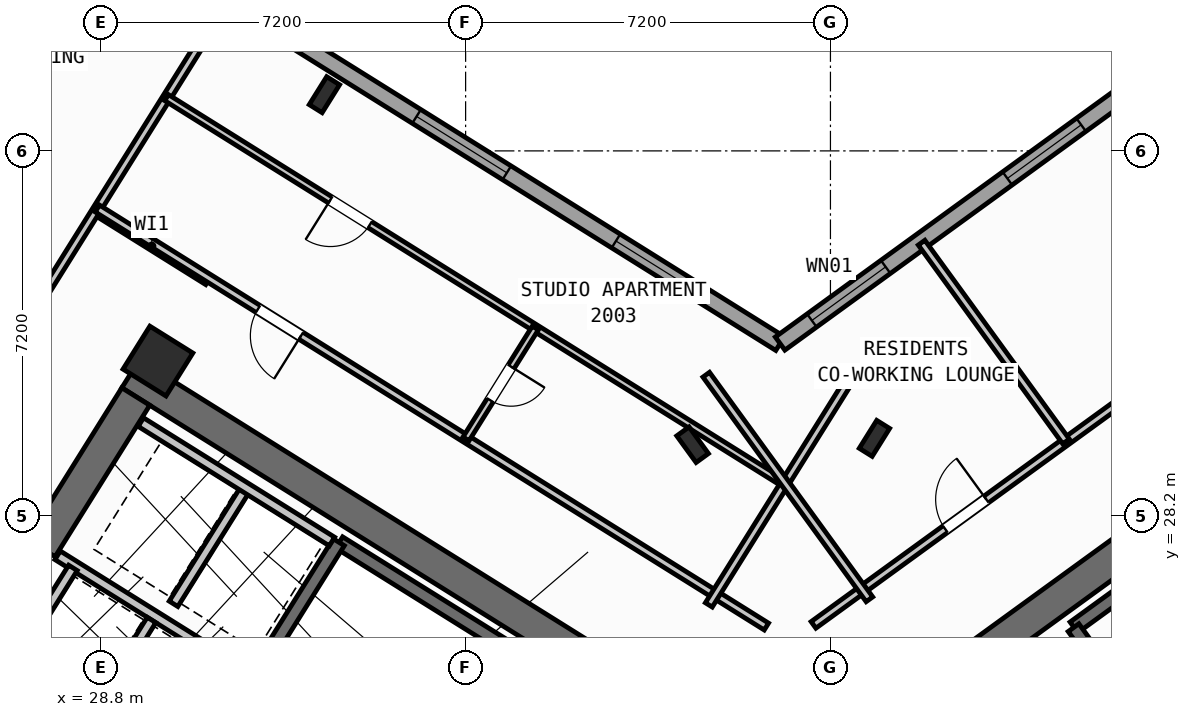
"""IFC4 building model, lengths in metres.
Left out: names, types, materials, properties, quantities, classifications, styles, units other than length and angle.
Written with IfcOpenShell. Run it as: python <this file> out.ifc"""

import sys

from ifc_helpers import new_model, si_unit, direction, frame, frame_2d, origin, origin_2d, place, context, subcontext, project, spatial, rectangle, hollow_rectangle, i_section, extrude, source, transform, mapped, element, fill, save


model = new_model("IFC4")
c1 = context("Model", 3, precision=1e-05, world=origin(), true_north=direction((0.0, 1.0)))
c2 = subcontext(c1, "Body", "Model", "MODEL_VIEW")
j1 = project(units=[si_unit("LENGTHUNIT", "METRE"), si_unit("PLANEANGLEUNIT", "RADIAN")], contexts=[c1])
p1 = place(None, origin())
s1 = spatial("IfcSite", under=j1, at=p1, CompositionType="ELEMENT")
p2 = place(p1, origin())
s2 = spatial("IfcBuilding", under=s1, at=p2, CompositionType="ELEMENT")
p3 = place(p2, frame((0.0, 0.0, 81.0)))
s3 = spatial("IfcBuildingStorey", under=s2, at=p3, CompositionType="ELEMENT", Elevation=81.0)
p4 = place(p3, frame((40.615, 23.983, 0.0), z_axis=(0.0, 0.0, 1.0), x_axis=(-0.848045953968, 0.529922692436, 0.0)))
e1 = element("IfcWall", 1, at=p4, inside=s3, PredefinedType="SHEAR", context=c2, shape_type="SweptSolid", body=[
    extrude(rectangle(XDim=13.24, YDim=0.65, at=frame_2d((6.62, 0.0))), origin(), (0.0, 0.0, 1.0), 3.32),
])
p5 = place(p3, frame((29.491, 30.552, 0.0), z_axis=(0.0, 0.0, 1.0), x_axis=(-0.529893103397, -0.8480644427, 0.0)))
e2 = element("IfcWall", 2, at=p5, inside=s3, PredefinedType="SHEAR", context=c2, shape_type="SweptSolid", body=[
    extrude(rectangle(XDim=3.525, YDim=0.65, at=frame_2d((1.763, 0.0))), origin(), (0.0, 0.0, 1.0), 3.32),
])
p6 = place(p3, frame((44.325, 24.113, 0.0), z_axis=(0.0, 0.0, 1.0), x_axis=(0.809012664862, 0.58779121131, 0.0)))
e3 = element("IfcWall", 3, at=p6, inside=s3, PredefinedType="SHEAR", context=c2, shape_type="SweptSolid", body=[
    extrude(rectangle(XDim=12.44, YDim=0.65, at=frame_2d((6.22, 0.0))), origin(), (0.0, 0.0, 1.0), 3.32),
])
m1 = source(origin(), c2, "Body", "SweptSolid", [
    extrude(i_section(OverallWidth=0.3, OverallDepth=0.65, WebThickness=0.016, FlangeThickness=0.031, at=origin_2d()), origin(), (0.0, 0.0, 1.0), 3.6),
])
for number, where, z_axis, x_axis in (
    (4, (44.068, 29.726, 0.0), (0.0, 0.0, 1.0), (-0.848, 0.53, 0.0)),
    (5, (33.213, 36.509, 0.0), (0.0, 0.0, 1.0), (-0.848, 0.53, 0.0)),
):
    element("IfcColumn", number, at=place(p3, frame(where, z_axis=z_axis, x_axis=x_axis)), inside=s3, PredefinedType="COLUMN", context=c2, shape_type="MappedRepresentation", body=[
        mapped(m1, transform((0.0, 0.0, 0.0), scale=1.0)),
    ])
m2 = source(origin(), c2, "Body", "SweptSolid", [
    extrude(hollow_rectangle(XDim=1.0, YDim=1.0, WallThickness=0.04, at=origin_2d()), origin(), (0.0, 0.0, 1.0), 3.6),
])
p7 = place(p3, frame((29.928, 31.251, 0.0), z_axis=(0.0, 0.0, 1.0), x_axis=(-0.848048096156, 0.529919264233, 0.0)))
e6 = element("IfcColumn", 6, at=p7, inside=s3, PredefinedType="COLUMN", context=c2, shape_type="MappedRepresentation", body=[
    mapped(m2, transform((0.0, 0.0, 0.0), scale=1.0)),
])
p8 = place(p3, frame((40.479, 29.601, 0.0), z_axis=(0.0, 0.0, 1.0), x_axis=(0.809016994375, 0.587785252292, 0.0)))
e7 = element("IfcColumn", 7, at=p8, inside=s3, PredefinedType="COLUMN", context=c2, shape_type="MappedRepresentation", body=[
    mapped(m1, transform((0.0, 0.0, 0.0), scale=1.0)),
])
p9 = place(p3, frame((31.76, 12.183, 0.0), z_axis=(0.0, 0.0, 1.0), x_axis=(-0.848047074256, 0.529920899612, 0.0)))
e8 = element("IfcWall", 8, at=p9, inside=s3, PredefinedType="STANDARD", context=c2, shape_type="SweptSolid", body=[
    extrude(rectangle(XDim=30.652, YDim=0.32, at=frame_2d((15.326, 0.0))), origin(), (0.0, 0.0, 1.0), 3.32),
])
p10 = place(p9, frame((14.878, 0.0, 0.0)))
e9 = element("IfcOpeningElement", 9, at=p10, cuts=e8, PredefinedType="OPENING", context=c2, shape_type="SweptSolid", body=[
    extrude(rectangle(XDim=1.2, YDim=2.15, at=frame_2d((0.6, 1.075))), frame((0.0, 0.17, 0.0), z_axis=(0.0, -1.0, 0.0), x_axis=(1.0, 0.0, 0.0)), (0.0, 0.0, 1.0), 0.34),
])
p11 = place(p9, frame((1.99, 0.0, 0.8)))
e10 = element("IfcOpeningElement", 10, at=p11, cuts=e8, PredefinedType="OPENING", context=c2, shape_type="SweptSolid", body=[
    extrude(rectangle(XDim=2.1, YDim=1.55, at=frame_2d((1.05, 0.775))), frame((0.0, 0.17, 0.0), z_axis=(0.0, -1.0, 0.0), x_axis=(1.0, 0.0, 0.0)), (0.0, 0.0, 1.0), 0.34),
])
p12 = place(p9, frame((7.169, 0.0, 0.8)))
e11 = element("IfcOpeningElement", 11, at=p12, cuts=e8, PredefinedType="OPENING", context=c2, shape_type="SweptSolid", body=[
    extrude(rectangle(XDim=2.1, YDim=1.55, at=frame_2d((1.05, 0.775))), frame((0.0, 0.17, 0.0), z_axis=(0.0, -1.0, 0.0), x_axis=(1.0, 0.0, 0.0)), (0.0, 0.0, 1.0), 0.34),
])
p13 = place(p9, frame((21.289, 0.0, 0.85)))
e12 = element("IfcOpeningElement", 12, at=p13, cuts=e8, PredefinedType="OPENING", context=c2, shape_type="SweptSolid", body=[
    extrude(rectangle(XDim=1.5, YDim=1.5, at=frame_2d((0.75, 0.75))), frame((0.0, 0.17, 0.0), z_axis=(0.0, -1.0, 0.0), x_axis=(1.0, 0.0, 0.0)), (0.0, 0.0, 1.0), 0.34),
])
p14 = place(p9, frame((25.59, 0.0, 1.0)))
e13 = element("IfcOpeningElement", 13, at=p14, cuts=e8, PredefinedType="OPENING", context=c2, shape_type="SweptSolid", body=[
    extrude(rectangle(XDim=0.9, YDim=1.25, at=frame_2d((0.45, 0.625))), frame((0.0, 0.17, 0.0), z_axis=(0.0, -1.0, 0.0), x_axis=(1.0, 0.0, 0.0)), (0.0, 0.0, 1.0), 0.34),
])
p15 = place(p9, frame((28.47, 0.0, 1.0)))
e14 = element("IfcOpeningElement", 14, at=p15, cuts=e8, PredefinedType="OPENING", context=c2, shape_type="SweptSolid", body=[
    extrude(rectangle(XDim=0.9, YDim=1.25, at=frame_2d((0.45, 0.625))), frame((0.0, 0.17, 0.0), z_axis=(0.0, -1.0, 0.0), x_axis=(1.0, 0.0, 0.0)), (0.0, 0.0, 1.0), 0.34),
])
p16 = place(p3, frame((17.424, 47.083, 0.0), z_axis=(0.0, 0.0, 1.0), x_axis=(0.848049927979, -0.529916332693, 0.0)))
e15 = element("IfcWall", 15, at=p16, inside=s3, PredefinedType="STANDARD", context=c2, shape_type="SweptSolid", body=[
    extrude(rectangle(XDim=29.223, YDim=0.32, at=frame_2d((14.612, 0.0))), origin(), (0.0, 0.0, 1.0), 3.32),
])
p17 = place(p16, frame((3.709, 0.0, 0.0)))
e16 = element("IfcOpeningElement", 16, at=p17, cuts=e15, PredefinedType="OPENING", context=c2, shape_type="SweptSolid", body=[
    extrude(rectangle(XDim=1.05, YDim=2.15, at=frame_2d((0.525, 1.075))), frame((0.0, 0.17, 0.0), z_axis=(0.0, -1.0, 0.0), x_axis=(1.0, 0.0, 0.0)), (0.0, 0.0, 1.0), 0.34),
])
p18 = place(p16, frame((0.659, 0.0, 0.95)))
e17 = element("IfcOpeningElement", 17, at=p18, cuts=e15, PredefinedType="OPENING", context=c2, shape_type="SweptSolid", body=[
    extrude(rectangle(XDim=1.2, YDim=1.4, at=frame_2d((0.6, 0.7))), frame((0.0, 0.17, 0.0), z_axis=(0.0, -1.0, 0.0), x_axis=(1.0, 0.0, 0.0)), (0.0, 0.0, 1.0), 0.34),
])
p19 = place(p16, frame((7.369, 0.0, 0.85)))
e18 = element("IfcOpeningElement", 18, at=p19, cuts=e15, PredefinedType="OPENING", context=c2, shape_type="SweptSolid", body=[
    extrude(rectangle(XDim=1.8, YDim=1.5, at=frame_2d((0.9, 0.75))), frame((0.0, 0.17, 0.0), z_axis=(0.0, -1.0, 0.0), x_axis=(1.0, 0.0, 0.0)), (0.0, 0.0, 1.0), 0.34),
])
p20 = place(p16, frame((11.009, 0.0, 1.0)))
e19 = element("IfcOpeningElement", 19, at=p20, cuts=e15, PredefinedType="OPENING", context=c2, shape_type="SweptSolid", body=[
    extrude(rectangle(XDim=0.9, YDim=1.25, at=frame_2d((0.45, 0.625))), frame((0.0, 0.17, 0.0), z_axis=(0.0, -1.0, 0.0), x_axis=(1.0, 0.0, 0.0)), (0.0, 0.0, 1.0), 0.34),
])
p21 = place(p16, frame((13.874, 0.0, 0.95)))
e20 = element("IfcOpeningElement", 20, at=p21, cuts=e15, PredefinedType="OPENING", context=c2, shape_type="SweptSolid", body=[
    extrude(rectangle(XDim=1.2, YDim=1.4, at=frame_2d((0.6, 0.7))), frame((0.0, 0.17, 0.0), z_axis=(0.0, -1.0, 0.0), x_axis=(1.0, 0.0, 0.0)), (0.0, 0.0, 1.0), 0.34),
])
p22 = place(p16, frame((17.254, 0.0, 1.0)))
e21 = element("IfcOpeningElement", 21, at=p22, cuts=e15, PredefinedType="OPENING", context=c2, shape_type="SweptSolid", body=[
    extrude(rectangle(XDim=0.9, YDim=1.25, at=frame_2d((0.45, 0.625))), frame((0.0, 0.17, 0.0), z_axis=(0.0, -1.0, 0.0), x_axis=(1.0, 0.0, 0.0)), (0.0, 0.0, 1.0), 0.34),
])
p23 = place(p16, frame((20.764, 0.0, 0.8)))
e22 = element("IfcOpeningElement", 22, at=p23, cuts=e15, PredefinedType="OPENING", context=c2, shape_type="SweptSolid", body=[
    extrude(rectangle(XDim=2.1, YDim=1.55, at=frame_2d((1.05, 0.775))), frame((0.0, 0.17, 0.0), z_axis=(0.0, -1.0, 0.0), x_axis=(1.0, 0.0, 0.0)), (0.0, 0.0, 1.0), 0.34),
])
p24 = place(p16, frame((25.403, 0.0, 0.8)))
e23 = element("IfcOpeningElement", 23, at=p24, cuts=e15, PredefinedType="OPENING", context=c2, shape_type="SweptSolid", body=[
    extrude(rectangle(XDim=2.1, YDim=1.55, at=frame_2d((1.05, 0.775))), frame((0.0, 0.17, 0.0), z_axis=(0.0, -1.0, 0.0), x_axis=(1.0, 0.0, 0.0)), (0.0, 0.0, 1.0), 0.34),
])
p25 = place(p3, frame((42.207, 31.597, 0.0), z_axis=(0.0, 0.0, 1.0), x_axis=(0.809020333377, 0.587780656523, 0.0)))
e24 = element("IfcWall", 24, at=p25, inside=s3, PredefinedType="STANDARD", context=c2, shape_type="SweptSolid", body=[
    extrude(rectangle(XDim=15.223, YDim=0.32, at=frame_2d((7.611, 0.0))), origin(), (0.0, 0.0, 1.0), 3.32),
])
p26 = place(p25, frame((12.82, 0.0, 0.0)))
e25 = element("IfcOpeningElement", 25, at=p26, cuts=e24, PredefinedType="OPENING", context=c2, shape_type="SweptSolid", body=[
    extrude(rectangle(XDim=1.05, YDim=2.15, at=frame_2d((0.525, 1.075))), frame((0.0, 0.17, 0.0), z_axis=(0.0, -1.0, 0.0), x_axis=(1.0, 0.0, 0.0)), (0.0, 0.0, 1.0), 0.34),
])
p27 = place(p25, frame((0.775, 0.0, 0.85)))
e26 = element("IfcOpeningElement", 26, at=p27, cuts=e24, PredefinedType="OPENING", context=c2, shape_type="SweptSolid", body=[
    extrude(rectangle(XDim=1.8, YDim=1.5, at=frame_2d((0.9, 0.75))), frame((0.0, 0.17, 0.0), z_axis=(0.0, -1.0, 0.0), x_axis=(1.0, 0.0, 0.0)), (0.0, 0.0, 1.0), 0.34),
])
p28 = place(p25, frame((5.544, 0.0, 0.85)))
e27 = element("IfcOpeningElement", 27, at=p28, cuts=e24, PredefinedType="OPENING", context=c2, shape_type="SweptSolid", body=[
    extrude(rectangle(XDim=1.8, YDim=1.5, at=frame_2d((0.9, 0.75))), frame((0.0, 0.17, 0.0), z_axis=(0.0, -1.0, 0.0), x_axis=(1.0, 0.0, 0.0)), (0.0, 0.0, 1.0), 0.34),
])
p29 = place(p25, frame((10.219, 0.0, 1.0)))
e28 = element("IfcOpeningElement", 28, at=p29, cuts=e24, PredefinedType="OPENING", context=c2, shape_type="SweptSolid", body=[
    extrude(rectangle(XDim=0.9, YDim=1.25, at=frame_2d((0.45, 0.625))), frame((0.0, 0.17, 0.0), z_axis=(0.0, -1.0, 0.0), x_axis=(1.0, 0.0, 0.0)), (0.0, 0.0, 1.0), 0.34),
])
p30 = place(p3, frame((39.721, 23.788, 0.0), z_axis=(0.0, 0.0, 1.0), x_axis=(-0.848054434086, 0.529909121291, 0.0)))
e29 = element("IfcWall", 29, at=p30, inside=s3, PredefinedType="SHEAR", context=c2, shape_type="SweptSolid", body=[
    extrude(rectangle(XDim=7.33, YDim=0.26, at=frame_2d((3.665, 0.0))), origin(), (0.0, 0.0, 1.0), 3.32),
])
p31 = place(p3, frame((33.496, 27.677, 0.0), z_axis=(0.0, 0.0, 1.0), x_axis=(-0.529908658664, -0.84805472316, 0.0)))
e30 = element("IfcWall", 30, at=p31, inside=s3, PredefinedType="SHEAR", context=c2, shape_type="SweptSolid", body=[
    extrude(rectangle(XDim=3.16, YDim=0.26, at=frame_2d((1.58, 0.0))), origin(), (0.0, 0.0, 1.0), 3.32),
])
p32 = place(p3, frame((31.822, 24.998, 0.0), z_axis=(0.0, 0.0, 1.0), x_axis=(-0.848058348634, 0.529902856485, 0.0)))
e31 = element("IfcWall", 31, at=p32, inside=s3, PredefinedType="STANDARD", context=c2, shape_type="SweptSolid", body=[
    extrude(rectangle(XDim=4.568, YDim=0.2, at=frame_2d((2.284, 0.0))), origin(), (0.0, 0.0, 1.0), 3.31),
])
p33 = place(p3, frame((32.108, 22.814, 0.0), z_axis=(0.0, 0.0, 1.0), x_axis=(-0.848042229521, 0.529928652696, 0.0)))
e32 = element("IfcWall", 32, at=p33, inside=s3, PredefinedType="STANDARD", context=c2, shape_type="SweptSolid", body=[
    extrude(rectangle(XDim=5.62, YDim=0.2, at=frame_2d((2.81, 0.0))), origin(), (0.0, 0.0, 1.0), 3.31),
])
p34 = place(p3, frame((28.25, 27.17, 0.0), z_axis=(0.0, 0.0, 1.0), x_axis=(-0.529905827651, -0.848056492117, 0.0)))
e33 = element("IfcWall", 33, at=p34, inside=s3, PredefinedType="STANDARD", context=c2, shape_type="SweptSolid", body=[
    extrude(rectangle(XDim=1.65, YDim=0.2, at=frame_2d((0.825, 0.0))), origin(), (0.0, 0.0, 1.0), 3.31),
])
p35 = place(p3, frame((31.645, 28.716, 0.0), z_axis=(0.0, 0.0, 1.0), x_axis=(-0.52986693015, -0.848080795876, 0.0)))
e34 = element("IfcWall", 34, at=p35, inside=s3, PredefinedType="STANDARD", context=c2, shape_type="SweptSolid", body=[
    extrude(rectangle(XDim=2.66, YDim=0.2, at=frame_2d((1.33, 0.0))), origin(), (0.0, 0.0, 1.0), 3.31),
])
p36 = place(p3, frame((33.363, 27.69, 0.0), z_axis=(0.0, 0.0, 1.0), x_axis=(-0.848053806312, 0.529910125964, 0.0)))
e35 = element("IfcWall", 35, at=p36, inside=s3, PredefinedType="STANDARD", context=c2, shape_type="SweptSolid", body=[
    extrude(rectangle(XDim=4.448, YDim=0.2, at=frame_2d((2.224, 0.0))), origin(), (0.0, 0.0, 1.0), 3.31),
])
p37 = place(p3, frame((29.801, 26.142, 0.0), z_axis=(0.0, 0.0, 1.0), x_axis=(-0.529998940003, -0.847998304005, 0.0)))
e36 = element("IfcWall", 36, at=p37, inside=s3, PredefinedType="STANDARD", context=c2, shape_type="SweptSolid", body=[
    extrude(rectangle(XDim=1.58, YDim=0.2, at=frame_2d((0.79, 0.0))), origin(), (0.0, 0.0, 1.0), 3.31),
])
p38 = place(p3, frame((48.006, 25.996, 0.0), z_axis=(0.0, 0.0, 1.0), x_axis=(0.80901903764, 0.587782439969, 0.0)))
e37 = element("IfcWall", 37, at=p38, inside=s3, PredefinedType="SHEAR", context=c2, shape_type="SweptSolid", body=[
    extrude(rectangle(XDim=7.46, YDim=0.26, at=frame_2d((3.73, 0.0))), origin(), (0.0, 0.0, 1.0), 3.32),
])
p39 = place(p3, frame((49.855, 23.434, 0.0), z_axis=(0.0, 0.0, 1.0), x_axis=(-0.58776738483, 0.809029975545, 0.0)))
e38 = element("IfcWall", 38, at=p39, inside=s3, PredefinedType="SHEAR", context=c2, shape_type="SweptSolid", body=[
    extrude(rectangle(XDim=3.16, YDim=0.26, at=frame_2d((1.58, 0.0))), origin(), (0.0, 0.0, 1.0), 3.32),
])
p40 = place(p3, frame((30.914, 32.829, 0.0), z_axis=(0.0, 0.0, 1.0), x_axis=(-0.848008813643, 0.529982124211, 0.0)))
e39 = element("IfcWall", 39, at=p40, inside=s3, PredefinedType="PARTITIONING", context=c2, shape_type="SweptSolid", body=[
    extrude(rectangle(XDim=2.61, YDim=0.16, at=frame_2d((1.305, 0.0))), origin(), (0.0, 0.0, 1.0), 3.31),
])
p41 = place(p3, frame((31.239, 38.274, 0.0), z_axis=(0.0, 0.0, 1.0), x_axis=(-0.529914125013, -0.848051307476, 0.0)))
e40 = element("IfcWall", 40, at=p41, inside=s3, PredefinedType="PARTITIONING", context=c2, shape_type="SweptSolid", body=[
    extrude(rectangle(XDim=10.35, YDim=0.16, at=frame_2d((5.175, 0.0))), origin(), (0.0, 0.0, 1.0), 3.31),
])
p42 = place(p3, frame((41.936, 26.012, 0.0), z_axis=(0.0, 0.0, 1.0), x_axis=(-0.848051154596, 0.529914369676, 0.0)))
e41 = element("IfcWall", 41, at=p42, inside=s3, PredefinedType="PARTITIONING", context=c2, shape_type="SweptSolid", body=[
    extrude(rectangle(XDim=15.57, YDim=0.16, at=frame_2d((7.785, 0.0))), origin(), (0.0, 0.0, 1.0), 3.31),
])
p43 = place(p42, frame((10.83, 0.0, 0.0)))
e42 = element("IfcOpeningElement", 42, at=p43, cuts=e41, PredefinedType="OPENING", context=c2, shape_type="SweptSolid", body=[
    extrude(rectangle(XDim=1.0, YDim=2.1, at=frame_2d((0.5, 1.05))), frame((0.0, 0.09, 0.0), z_axis=(0.0, -1.0, 0.0), x_axis=(1.0, 0.0, 0.0)), (0.0, 0.0, 1.0), 0.18),
])
p44 = place(p3, frame((43.704, 31.086, 0.0), z_axis=(0.0, 0.0, 1.0), x_axis=(-0.529906828443, -0.848055866774, 0.0)))
e43 = element("IfcWall", 43, at=p44, inside=s3, PredefinedType="PARTITIONING", context=c2, shape_type="SweptSolid", body=[
    extrude(rectangle(XDim=5.48, YDim=0.16, at=frame_2d((2.74, 0.0))), origin(), (0.0, 0.0, 1.0), 3.31),
])
p45 = place(p3, frame((42.226, 28.873, 0.0), z_axis=(0.0, 0.0, 1.0), x_axis=(-0.848049134363, 0.529917602752, 0.0)))
e44 = element("IfcWall", 44, at=p45, inside=s3, PredefinedType="PLUMBINGWALL", context=c2, shape_type="SweptSolid", body=[
    extrude(rectangle(XDim=14.3, YDim=0.14, at=frame_2d((7.15, 0.0))), origin(), (0.0, 0.0, 1.0), 3.31),
])
p46 = place(p45, frame((9.57, 0.0, 0.0)))
e45 = element("IfcOpeningElement", 45, at=p46, cuts=e44, PredefinedType="OPENING", context=c2, shape_type="SweptSolid", body=[
    extrude(rectangle(XDim=0.92, YDim=2.08, at=frame_2d((0.46, 1.04))), frame((0.0, 0.08, 0.0), z_axis=(0.0, -1.0, 0.0), x_axis=(1.0, 0.0, 0.0)), (0.0, 0.0, 1.0), 0.16),
])
p47 = place(p3, frame((37.375, 31.904, 0.0), z_axis=(0.0, 0.0, 1.0), x_axis=(-0.529913878929, -0.848051461244, 0.0)))
e46 = element("IfcWall", 46, at=p47, inside=s3, PredefinedType="PLUMBINGWALL", context=c2, shape_type="SweptSolid", body=[
    extrude(rectangle(XDim=2.58, YDim=0.14, at=frame_2d((1.29, 0.0))), origin(), (0.0, 0.0, 1.0), 3.31),
])
p48 = place(p47, frame((0.9, 0.0, 0.0)))
e47 = element("IfcOpeningElement", 47, at=p48, cuts=e46, PredefinedType="OPENING", context=c2, shape_type="SweptSolid", body=[
    extrude(rectangle(XDim=0.78, YDim=2.05, at=frame_2d((0.39, 1.025))), frame((0.0, 0.08, 0.0), z_axis=(0.0, -1.0, 0.0), x_axis=(1.0, 0.0, 0.0)), (0.0, 0.0, 1.0), 0.16),
])
p49 = place(p3, frame((42.866, 26.044, 0.0), z_axis=(0.0, 0.0, 1.0), x_axis=(0.809020254154, 0.587780765566, 0.0)))
e48 = element("IfcWall", 48, at=p49, inside=s3, PredefinedType="PARTITIONING", context=c2, shape_type="SweptSolid", body=[
    extrude(rectangle(XDim=14.67, YDim=0.16, at=frame_2d((7.335, 0.0))), origin(), (0.0, 0.0, 1.0), 3.31),
])
p50 = place(p49, frame((3.215, 0.0, 0.0)))
e49 = element("IfcOpeningElement", 49, at=p50, cuts=e48, PredefinedType="OPENING", context=c2, shape_type="SweptSolid", body=[
    extrude(rectangle(XDim=1.0, YDim=2.1, at=frame_2d((0.5, 1.05))), frame((0.0, 0.09, 0.0), z_axis=(0.0, -1.0, 0.0), x_axis=(1.0, 0.0, 0.0)), (0.0, 0.0, 1.0), 0.18),
])
p51 = place(p49, frame((9.915, 0.0, 0.0)))
e50 = element("IfcOpeningElement", 50, at=p51, cuts=e48, PredefinedType="OPENING", context=c2, shape_type="SweptSolid", body=[
    extrude(rectangle(XDim=1.0, YDim=2.1, at=frame_2d((0.5, 1.05))), frame((0.0, 0.09, 0.0), z_axis=(0.0, -1.0, 0.0), x_axis=(1.0, 0.0, 0.0)), (0.0, 0.0, 1.0), 0.18),
])
p52 = place(p3, frame((43.969, 26.55, 0.0), z_axis=(0.0, 0.0, 1.0), x_axis=(-0.587776919386, 0.80902304852, 0.0)))
e51 = element("IfcWall", 51, at=p52, inside=s3, PredefinedType="PARTITIONING", context=c2, shape_type="SweptSolid", body=[
    extrude(rectangle(XDim=5.48, YDim=0.16, at=frame_2d((2.74, 0.0))), origin(), (0.0, 0.0, 1.0), 3.31),
])
p53 = place(p3, frame((47.849, 29.665, 0.0), z_axis=(0.0, 0.0, 1.0), x_axis=(-0.587785532001, 0.809016791155, 0.0)))
e52 = element("IfcWall", 52, at=p53, inside=s3, PredefinedType="PARTITIONING", context=c2, shape_type="SweptSolid", body=[
    extrude(rectangle(XDim=4.85, YDim=0.16, at=frame_2d((2.425, 0.0))), origin(), (0.0, 0.0, 1.0), 3.31),
])
m3 = source(origin(), c2, "Body", "SweptSolid", [
    extrude(rectangle(XDim=2.1, YDim=1.55, at=frame_2d((1.05, 0.775))), frame((0.0, 0.03, 0.0), z_axis=(0.0, -1.0, 0.0), x_axis=(1.0, 0.0, 0.0)), (0.0, 0.0, 1.0), 0.06),
])
p54 = place(p23, origin())
e53 = element("IfcWindow", 53, at=p54, inside=s3, PartitioningType="SINGLE_PANEL", PredefinedType="WINDOW", context=c2, shape_type="MappedRepresentation", body=[
    mapped(m3, transform((0.0, 0.0, 0.0), scale=1.0)),
])
fill(e22, e53)
p55 = place(p24, origin())
e54 = element("IfcWindow", 54, at=p55, inside=s3, PartitioningType="SINGLE_PANEL", PredefinedType="WINDOW", context=c2, shape_type="MappedRepresentation", body=[
    mapped(m3, transform((0.0, 0.0, 0.0), scale=1.0)),
])
fill(e23, e54)
m4 = source(origin(), c2, "Body", "SweptSolid", [
    extrude(rectangle(XDim=1.8, YDim=1.5, at=frame_2d((0.9, 0.75))), frame((0.0, 0.03, 0.0), z_axis=(0.0, -1.0, 0.0), x_axis=(1.0, 0.0, 0.0)), (0.0, 0.0, 1.0), 0.06),
])
p56 = place(p27, origin())
e55 = element("IfcWindow", 55, at=p56, inside=s3, PartitioningType="SINGLE_PANEL", PredefinedType="WINDOW", context=c2, shape_type="MappedRepresentation", body=[
    mapped(m4, transform((0.0, 0.0, 0.0), scale=1.0)),
])
fill(e26, e55)
p57 = place(p28, origin())
e56 = element("IfcWindow", 56, at=p57, inside=s3, PartitioningType="SINGLE_PANEL", PredefinedType="WINDOW", context=c2, shape_type="MappedRepresentation", body=[
    mapped(m4, transform((0.0, 0.0, 0.0), scale=1.0)),
])
fill(e27, e56)
m5 = source(origin(), c2, "Body", "SweptSolid", [
    extrude(rectangle(XDim=1.0, YDim=2.1, at=frame_2d((0.5, 1.05))), frame((0.0, 0.025, 0.0), z_axis=(0.0, -1.0, 0.0), x_axis=(1.0, 0.0, 0.0)), (0.0, 0.0, 1.0), 0.05),
])
p58 = place(p43, origin())
e57 = element("IfcDoor", 57, at=p58, inside=s3, OperationType="SINGLE_SWING_LEFT", PredefinedType="DOOR", context=c2, shape_type="MappedRepresentation", body=[
    mapped(m5, transform((0.0, 0.0, 0.0), scale=1.0)),
])
fill(e42, e57)
m6 = source(origin(), c2, "Body", "SweptSolid", [
    extrude(rectangle(XDim=0.92, YDim=2.08, at=frame_2d((0.46, 1.04))), frame((0.0, 0.025, 0.0), z_axis=(0.0, -1.0, 0.0), x_axis=(1.0, 0.0, 0.0)), (0.0, 0.0, 1.0), 0.05),
])
p59 = place(p46, origin())
e58 = element("IfcDoor", 58, at=p59, inside=s3, OperationType="SINGLE_SWING_RIGHT", PredefinedType="DOOR", context=c2, shape_type="MappedRepresentation", body=[
    mapped(m6, transform((0.0, 0.0, 0.0), scale=1.0)),
])
fill(e45, e58)
m7 = source(origin(), c2, "Body", "SweptSolid", [
    extrude(rectangle(XDim=0.78, YDim=2.05, at=frame_2d((0.39, 1.025))), frame((0.0, 0.025, 0.0), z_axis=(0.0, -1.0, 0.0), x_axis=(1.0, 0.0, 0.0)), (0.0, 0.0, 1.0), 0.05),
])
p60 = place(p48, origin())
e59 = element("IfcDoor", 59, at=p60, inside=s3, OperationType="SINGLE_SWING_LEFT", PredefinedType="DOOR", context=c2, shape_type="MappedRepresentation", body=[
    mapped(m7, transform((0.0, 0.0, 0.0), scale=1.0)),
])
fill(e47, e59)
p61 = place(p50, origin())
e60 = element("IfcDoor", 60, at=p61, inside=s3, OperationType="SINGLE_SWING_RIGHT", PredefinedType="DOOR", context=c2, shape_type="MappedRepresentation", body=[
    mapped(m5, transform((0.0, 0.0, 0.0), scale=1.0)),
])
fill(e49, e60)
save(model, sys.argv[1])
